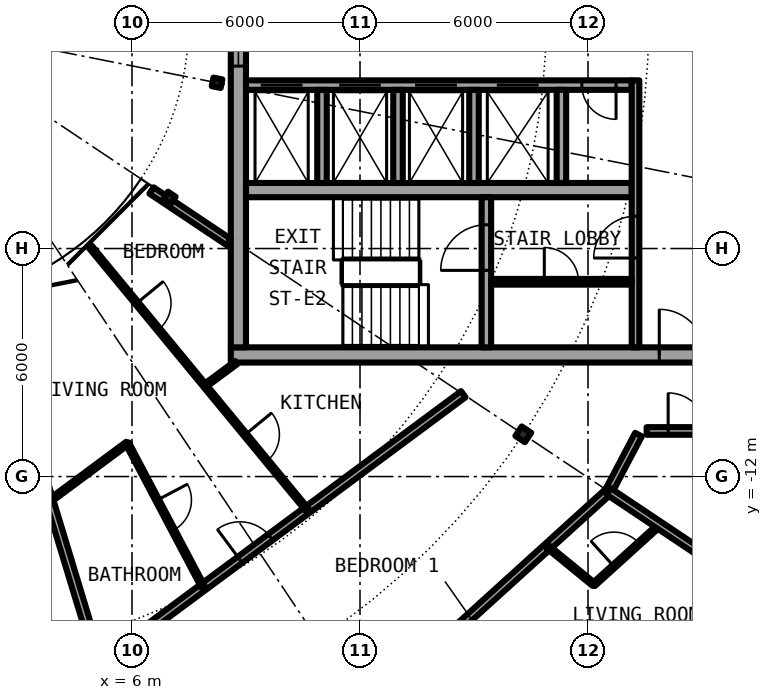
"""IFC4 building model, lengths in metres.
Left out: names, types, materials, properties, quantities, classifications, styles, units other than length and angle.
Written with IfcOpenShell. Run it as: python <this file> out.ifc"""

import sys

from ifc_helpers import new_model, si_unit, direction, frame, frame_2d, origin, origin_2d, place, context, subcontext, project, spatial, rectangle, i_section, extrude, element, fill, save


model = new_model("IFC4")
c1 = context("Model", 3, precision=1e-05, world=origin(), true_north=direction((0.0, 1.0)))
c2 = subcontext(c1, "Body", "Model", "MODEL_VIEW")
j1 = project(units=[si_unit("LENGTHUNIT", "METRE"), si_unit("PLANEANGLEUNIT", "RADIAN")], contexts=[c1])
p1 = place(None, origin())
s1 = spatial("IfcSite", under=j1, at=p1, CompositionType="ELEMENT")
p2 = place(p1, origin())
s2 = spatial("IfcBuilding", under=s1, at=p2, CompositionType="ELEMENT")
p3 = place(p2, frame((0.0, 0.0, 227.95)))
s3 = spatial("IfcBuildingStorey", under=s2, at=p3, CompositionType="ELEMENT", Elevation=227.95)
p4 = place(p3, frame((16.297, -10.889, 0.0), z_axis=(0.0, 0.0, 1.0), x_axis=(0.831469612303, -0.55557023302, 0.0)))
e1 = element("IfcColumn", 1, at=p4, inside=s3, PredefinedType="COLUMN", context=c2, shape_type="SweptSolid", body=[
    extrude(i_section(OverallWidth=0.3, OverallDepth=0.3, WebThickness=0.011, FlangeThickness=0.019, FilletRadius=0.027, at=origin_2d()), origin(), (0.0, 0.0, 1.0), 3.05),
])
for number, where, z_axis, x_axis in (
    (2, (6.984, -4.667, 0.0), (0.0, 0.0, 1.0), (0.831, -0.556, 0.0)),
    (3, (8.239, -1.639, 0.0), (0.0, 0.0, 1.0), (0.981, -0.195, 0.0)),
):
    element("IfcColumn", number, at=place(p3, frame(where, z_axis=z_axis, x_axis=x_axis)), inside=s3, PredefinedType="COLUMN", context=c2, shape_type="SweptSolid", body=[
        extrude(i_section(OverallWidth=0.24, OverallDepth=0.23, WebThickness=0.008, FlangeThickness=0.012, FilletRadius=0.021, at=origin_2d()), origin(), (0.0, 0.0, 1.0), 3.05),
    ])
p5 = place(p3, frame((19.304, -19.304, 0.0), z_axis=(0.0, 0.0, 1.0), x_axis=(0.634382322723, 0.773019449054, 0.0)))
e4 = element("IfcWall", 4, at=p5, inside=s3, PredefinedType="SOLIDWALL", context=c2, shape_type="SweptSolid", body=[
    extrude(rectangle(XDim=5.352, YDim=0.25, at=frame_2d((2.676, 0.0))), origin(), (0.0, 0.0, 1.0), 2.7),
])
p6 = place(p5, frame((0.841, 0.0, 0.0)))
e5 = element("IfcOpeningElement", 5, at=p6, cuts=e4, PredefinedType="OPENING", context=c2, shape_type="SweptSolid", body=[
    extrude(rectangle(XDim=1.0, YDim=2.2, at=frame_2d((0.5, 1.1))), frame((0.0, 0.135, 0.0), z_axis=(0.0, -1.0, 0.0), x_axis=(1.0, 0.0, 0.0)), (0.0, 0.0, 1.0), 0.27),
])
p7 = place(p5, frame((3.111, 0.0, 0.3)))
e6 = element("IfcOpeningElement", 6, at=p7, cuts=e4, PredefinedType="OPENING", context=c2, shape_type="SweptSolid", body=[
    extrude(rectangle(XDim=1.8, YDim=2.1, at=frame_2d((0.9, 1.05))), frame((0.0, 0.135, 0.0), z_axis=(0.0, -1.0, 0.0), x_axis=(1.0, 0.0, 0.0)), (0.0, 0.0, 1.0), 0.27),
])
p8 = place(p3, frame((8.6, -8.8, 0.0), z_axis=(0.0, 0.0, 1.0), x_axis=(1.0, 0.0, 0.0)))
e7 = element("IfcWall", 7, at=p8, inside=s3, PredefinedType="SHEAR", context=c2, shape_type="SweptSolid", body=[
    extrude(rectangle(XDim=13.4, YDim=0.4, at=frame_2d((6.7, 0.0))), origin(), (0.0, 0.0, 1.0), 3.05),
])
p9 = place(p8, frame((11.275, 0.0, 0.0)))
e8 = element("IfcOpeningElement", 8, at=p9, cuts=e7, PredefinedType="OPENING", context=c2, shape_type="SweptSolid", body=[
    extrude(rectangle(XDim=1.2, YDim=2.3, at=frame_2d((0.6, 1.15))), frame((0.0, 0.21, 0.0), z_axis=(0.0, -1.0, 0.0), x_axis=(1.0, 0.0, 0.0)), (0.0, 0.0, 1.0), 0.42),
])
p10 = place(p3, frame((8.8, -8.6, 0.0), z_axis=(0.0, 0.0, 1.0), x_axis=(0.0, 1.0, 0.0)))
e9 = element("IfcWall", 9, at=p10, inside=s3, PredefinedType="SHEAR", context=c2, shape_type="SweptSolid", body=[
    extrude(rectangle(XDim=17.2, YDim=0.4, at=frame_2d((8.6, 0.0))), origin(), (0.0, 0.0, 1.0), 3.05),
])
p11 = place(p10, frame((7.4, 0.0, 0.1)))
e10 = element("IfcOpeningElement", 10, at=p11, cuts=e9, PredefinedType="OPENING", context=c2, shape_type="SweptSolid", body=[
    extrude(rectangle(XDim=2.4, YDim=2.2, at=frame_2d((1.2, 1.1))), frame((0.0, 0.21, 0.0), z_axis=(0.0, -1.0, 0.0), x_axis=(1.0, 0.0, 0.0)), (0.0, 0.0, 1.0), 0.42),
])
p12 = place(p3, frame((19.15, -1.7, 0.0), z_axis=(0.0, 0.0, 1.0), x_axis=(-1.0, 0.0, 0.0)))
e11 = element("IfcWall", 11, at=p12, inside=s3, PredefinedType="SHEAR", context=c2, shape_type="SweptSolid", body=[
    extrude(rectangle(XDim=10.15, YDim=0.25, at=frame_2d((5.075, 0.0))), origin(), (0.0, 0.0, 1.0), 3.05),
])
p13 = place(p12, frame((8.663, 0.0, 0.0)))
e12 = element("IfcOpeningElement", 12, at=p13, cuts=e11, PredefinedType="OPENING", context=c2, shape_type="SweptSolid", body=[
    extrude(rectangle(XDim=1.1, YDim=2.3, at=frame_2d((0.55, 1.15))), frame((0.0, 0.135, 0.0), z_axis=(0.0, -1.0, 0.0), x_axis=(1.0, 0.0, 0.0)), (0.0, 0.0, 1.0), 0.27),
])
p14 = place(p12, frame((6.6, 0.0, 0.0)))
e13 = element("IfcOpeningElement", 13, at=p14, cuts=e11, PredefinedType="OPENING", context=c2, shape_type="SweptSolid", body=[
    extrude(rectangle(XDim=1.1, YDim=2.3, at=frame_2d((0.55, 1.15))), frame((0.0, 0.135, 0.0), z_axis=(0.0, -1.0, 0.0), x_axis=(1.0, 0.0, 0.0)), (0.0, 0.0, 1.0), 0.27),
])
p15 = place(p12, frame((4.6, 0.0, 0.0)))
e14 = element("IfcOpeningElement", 14, at=p15, cuts=e11, PredefinedType="OPENING", context=c2, shape_type="SweptSolid", body=[
    extrude(rectangle(XDim=1.1, YDim=2.3, at=frame_2d((0.55, 1.15))), frame((0.0, 0.135, 0.0), z_axis=(0.0, -1.0, 0.0), x_axis=(1.0, 0.0, 0.0)), (0.0, 0.0, 1.0), 0.27),
])
p16 = place(p12, frame((2.45, 0.0, 0.0)))
e15 = element("IfcOpeningElement", 15, at=p16, cuts=e11, PredefinedType="OPENING", context=c2, shape_type="SweptSolid", body=[
    extrude(rectangle(XDim=1.1, YDim=2.3, at=frame_2d((0.55, 1.15))), frame((0.0, 0.135, 0.0), z_axis=(0.0, -1.0, 0.0), x_axis=(1.0, 0.0, 0.0)), (0.0, 0.0, 1.0), 0.27),
])
p17 = place(p12, frame((0.413, 0.0, 0.0)))
e16 = element("IfcOpeningElement", 16, at=p17, cuts=e11, PredefinedType="OPENING", context=c2, shape_type="SweptSolid", body=[
    extrude(rectangle(XDim=0.9, YDim=2.3, at=frame_2d((0.45, 1.15))), frame((0.0, 0.135, 0.0), z_axis=(0.0, -1.0, 0.0), x_axis=(1.0, 0.0, 0.0)), (0.0, 0.0, 1.0), 0.27),
])
p18 = place(p3, frame((9.0, -4.462, 0.0), z_axis=(0.0, 0.0, 1.0), x_axis=(1.0, 0.0, 0.0)))
e17 = element("IfcWall", 17, at=p18, inside=s3, PredefinedType="SHEAR", context=c2, shape_type="SweptSolid", body=[
    extrude(rectangle(XDim=10.15, YDim=0.375, at=frame_2d((5.075, 0.0))), origin(), (0.0, 0.0, 1.0), 3.05),
])
p19 = place(p3, frame((15.325, -8.6, 0.0), z_axis=(0.0, 0.0, 1.0), x_axis=(0.0, 1.0, 0.0)))
e18 = element("IfcWall", 18, at=p19, inside=s3, PredefinedType="SHEAR", context=c2, shape_type="SweptSolid", body=[
    extrude(rectangle(XDim=3.95, YDim=0.25, at=frame_2d((1.975, 0.0))), origin(), (0.0, 0.0, 1.0), 3.05),
])
p20 = place(p19, frame((2.025, 0.0, 0.0)))
e19 = element("IfcOpeningElement", 19, at=p20, cuts=e18, PredefinedType="OPENING", context=c2, shape_type="SweptSolid", body=[
    extrude(rectangle(XDim=1.2, YDim=2.3, at=frame_2d((0.6, 1.15))), frame((0.0, 0.135, 0.0), z_axis=(0.0, -1.0, 0.0), x_axis=(1.0, 0.0, 0.0)), (0.0, 0.0, 1.0), 0.27),
])
for number, where, z_axis, x_axis in (
    (20, (15.0, -1.825, 0.0), (0.0, 0.0, 1.0), (0.0, -1.0, 0.0)),
    (21, (17.3, -1.825, 0.0), (0.0, 0.0, 1.0), (0.0, -1.0, 0.0)),
):
    element("IfcWall", number, at=place(p3, frame(where, z_axis=z_axis, x_axis=x_axis)), inside=s3, PredefinedType="SOLIDWALL", context=c2, shape_type="SweptSolid", body=[
        extrude(rectangle(XDim=2.45, YDim=0.25, at=frame_2d((1.225, 0.0))), origin(), (0.0, 0.0, 1.0), 2.7),
    ])
p21 = place(p3, frame((19.25, -8.6, 0.0), z_axis=(0.0, 0.0, 1.0), x_axis=(0.0, 1.0, 0.0)))
e22 = element("IfcWall", 22, at=p21, inside=s3, PredefinedType="SOLIDWALL", context=c2, shape_type="SweptSolid", body=[
    extrude(rectangle(XDim=7.025, YDim=0.2, at=frame_2d((3.513, 0.0))), origin(), (0.0, 0.0, 1.0), 2.7),
])
p22 = place(p21, frame((2.35, 0.0, 0.0)))
e23 = element("IfcOpeningElement", 23, at=p22, cuts=e22, PredefinedType="OPENING", context=c2, shape_type="SweptSolid", body=[
    extrude(rectangle(XDim=1.1, YDim=2.3, at=frame_2d((0.55, 1.15))), frame((0.0, 0.11, 0.0), z_axis=(0.0, -1.0, 0.0), x_axis=(1.0, 0.0, 0.0)), (0.0, 0.0, 1.0), 0.22),
])
for number, where, z_axis, x_axis in (
    (24, (11.0, -1.825, 0.0), (0.0, 0.0, 1.0), (0.0, -1.0, 0.0)),
    (25, (13.0, -1.825, 0.0), (0.0, 0.0, 1.0), (0.0, -1.0, 0.0)),
):
    element("IfcWall", number, at=place(p3, frame(where, z_axis=z_axis, x_axis=x_axis)), inside=s3, PredefinedType="SOLIDWALL", context=c2, shape_type="SweptSolid", body=[
        extrude(rectangle(XDim=2.45, YDim=0.25, at=frame_2d((1.225, 0.0))), origin(), (0.0, 0.0, 1.0), 2.7),
    ])
p23 = place(p3, frame((15.45, -6.875, 0.0), z_axis=(0.0, 0.0, 1.0), x_axis=(1.0, 0.0, 0.0)))
e26 = element("IfcWall", 26, at=p23, inside=s3, PredefinedType="PARTITIONING", context=c2, shape_type="SweptSolid", body=[
    extrude(rectangle(XDim=3.7, YDim=0.15, at=frame_2d((1.85, 0.0))), origin(), (0.0, 0.0, 1.0), 2.7),
])
p24 = place(p23, frame((1.4, 0.0, 0.0)))
e27 = element("IfcOpeningElement", 27, at=p24, cuts=e26, PredefinedType="OPENING", context=c2, shape_type="SweptSolid", body=[
    extrude(rectangle(XDim=0.9, YDim=2.3, at=frame_2d((0.45, 1.15))), frame((0.0, 0.085, 0.0), z_axis=(0.0, -1.0, 0.0), x_axis=(1.0, 0.0, 0.0)), (0.0, 0.0, 1.0), 0.17),
])
p25 = place(p3, frame((18.147, -14.844, 0.0), z_axis=(0.0, 0.0, 1.0), x_axis=(0.741080073381, 0.671416655169, 0.0)))
e28 = element("IfcWall", 28, at=p25, inside=s3, PredefinedType="PARTITIONING", context=c2, shape_type="SweptSolid", body=[
    extrude(rectangle(XDim=2.323, YDim=0.1, at=frame_2d((1.162, 0.0))), origin(), (0.0, 0.0, 1.0), 2.7),
])
p26 = place(p25, frame((0.718, 0.0, 0.0)))
e29 = element("IfcOpeningElement", 29, at=p26, cuts=e28, PredefinedType="OPENING", context=c2, shape_type="SweptSolid", body=[
    extrude(rectangle(XDim=0.9, YDim=2.3, at=frame_2d((0.45, 1.15))), frame((0.0, 0.06, 0.0), z_axis=(0.0, -1.0, 0.0), x_axis=(1.0, 0.0, 0.0)), (0.0, 0.0, 1.0), 0.12),
])
p27 = place(p3, frame((18.542, -12.389, 0.0), z_axis=(0.0, 0.0, 1.0), x_axis=(0.465812036273, 0.88488369115, 0.0)))
e30 = element("IfcWall", 30, at=p27, inside=s3, PredefinedType="PARTITIONING", context=c2, shape_type="SweptSolid", body=[
    extrude(rectangle(XDim=1.687, YDim=0.2, at=frame_2d((0.844, 0.0))), origin(), (0.0, 0.0, 1.0), 2.7),
])
p28 = place(p3, frame((10.512, -19.667, 0.0), z_axis=(0.0, 0.0, 1.0), x_axis=(0.740947367223, 0.671563101283, 0.0)))
e31 = element("IfcWall", 31, at=p28, inside=s3, PredefinedType="PARTITIONING", context=c2, shape_type="SweptSolid", body=[
    extrude(rectangle(XDim=10.837, YDim=0.2, at=frame_2d((5.419, 0.0))), origin(), (0.0, 0.0, 1.0), 2.7),
])
p29 = place(p28, frame((3.835, 0.0, 0.0)))
e32 = element("IfcOpeningElement", 32, at=p29, cuts=e31, PredefinedType="OPENING", context=c2, shape_type="SweptSolid", body=[
    extrude(rectangle(XDim=1.0, YDim=2.3, at=frame_2d((0.5, 1.15))), frame((0.0, 0.11, 0.0), z_axis=(0.0, -1.0, 0.0), x_axis=(1.0, 0.0, 0.0)), (0.0, 0.0, 1.0), 0.22),
])
p30 = place(p3, frame((5.137, -16.938, 0.0), z_axis=(0.0, 0.0, 1.0), x_axis=(0.803240181354, 0.595655278712, 0.0)))
e33 = element("IfcWall", 33, at=p30, inside=s3, PredefinedType="PARTITIONING", context=c2, shape_type="SweptSolid", body=[
    extrude(rectangle(XDim=11.928, YDim=0.2, at=frame_2d((5.964, 0.0))), origin(), (0.0, 0.0, 1.0), 2.7),
])
p31 = place(p30, frame((4.612, 0.0, 0.0)))
e34 = element("IfcOpeningElement", 34, at=p31, cuts=e33, PredefinedType="OPENING", context=c2, shape_type="SweptSolid", body=[
    extrude(rectangle(XDim=1.0, YDim=2.3, at=frame_2d((0.5, 1.15))), frame((0.0, 0.11, 0.0), z_axis=(0.0, -1.0, 0.0), x_axis=(1.0, 0.0, 0.0)), (0.0, 0.0, 1.0), 0.22),
])
p32 = place(p3, frame((3.834, -12.64, 0.0), z_axis=(0.0, 0.0, 1.0), x_axis=(0.803259509791, 0.595629213463, 0.0)))
e35 = element("IfcWall", 35, at=p32, inside=s3, PredefinedType="PARTITIONING", context=c2, shape_type="SweptSolid", body=[
    extrude(rectangle(XDim=2.543, YDim=0.1, at=frame_2d((1.272, 0.0))), origin(), (0.0, 0.0, 1.0), 2.7),
])
p33 = place(p3, frame((7.919, -9.611, 0.0), z_axis=(0.0, 0.0, 1.0), x_axis=(0.80321556998, 0.595688465677, 0.0)))
e36 = element("IfcWall", 36, at=p33, inside=s3, PredefinedType="PARTITIONING", context=c2, shape_type="SweptSolid", body=[
    extrude(rectangle(XDim=1.026, YDim=0.1, at=frame_2d((0.513, 0.0))), origin(), (0.0, 0.0, 1.0), 2.7),
])
p34 = place(p3, frame((19.543, -10.8, 0.0), z_axis=(0.0, 0.0, 1.0), x_axis=(1.0, 0.0, 0.0)))
e37 = element("IfcWall", 37, at=p34, inside=s3, PredefinedType="PARTITIONING", context=c2, shape_type="SweptSolid", body=[
    extrude(rectangle(XDim=2.132, YDim=0.2, at=frame_2d((1.066, 0.0))), origin(), (0.0, 0.0, 1.0), 2.7),
])
p35 = place(p34, frame((0.566, 0.0, 0.0)))
e38 = element("IfcOpeningElement", 38, at=p35, cuts=e37, PredefinedType="OPENING", context=c2, shape_type="SweptSolid", body=[
    extrude(rectangle(XDim=1.0, YDim=2.3, at=frame_2d((0.5, 1.15))), frame((0.0, 0.11, 0.0), z_axis=(0.0, -1.0, 0.0), x_axis=(1.0, 0.0, 0.0)), (0.0, 0.0, 1.0), 0.22),
])
p36 = place(p3, frame((6.513, -4.472, 0.0), z_axis=(0.0, 0.0, 1.0), x_axis=(0.831450132577, -0.555599385382, 0.0)))
e39 = element("IfcWall", 39, at=p36, inside=s3, PredefinedType="PARTITIONING", context=c2, shape_type="SweptSolid", body=[
    extrude(rectangle(XDim=2.443, YDim=0.2, at=frame_2d((1.221, 0.0))), origin(), (0.0, 0.0, 1.0), 2.7),
])
p37 = place(p3, frame((2.241, -7.388, 0.0), z_axis=(0.0, 0.0, 1.0), x_axis=(0.290284403441, -0.956940418793, 0.0)))
e40 = element("IfcWall", 40, at=p37, inside=s3, PredefinedType="PARTITIONING", context=c2, shape_type="SweptSolid", body=[
    extrude(rectangle(XDim=9.98, YDim=0.2, at=frame_2d((4.99, 0.0))), origin(), (0.0, 0.0, 1.0), 2.7),
])
p38 = place(p3, frame((4.908, -5.959, 0.0), z_axis=(0.0, 0.0, 1.0), x_axis=(0.636115614725, -0.771593756262, 0.0)))
e41 = element("IfcWall", 41, at=p38, inside=s3, PredefinedType="PARTITIONING", context=c2, shape_type="SweptSolid", body=[
    extrude(rectangle(XDim=8.967, YDim=0.1, at=frame_2d((4.483, 0.0))), origin(), (0.0, 0.0, 1.0), 2.7),
])
p39 = place(p38, frame((6.4, 0.0, 0.0)))
e42 = element("IfcOpeningElement", 42, at=p39, cuts=e41, PredefinedType="OPENING", context=c2, shape_type="SweptSolid", body=[
    extrude(rectangle(XDim=0.9, YDim=2.3, at=frame_2d((0.45, 1.15))), frame((0.0, 0.06, 0.0), z_axis=(0.0, -1.0, 0.0), x_axis=(1.0, 0.0, 0.0)), (0.0, 0.0, 1.0), 0.12),
])
p40 = place(p38, frame((1.917, 0.0, 0.0)))
e43 = element("IfcOpeningElement", 43, at=p40, cuts=e41, PredefinedType="OPENING", context=c2, shape_type="SweptSolid", body=[
    extrude(rectangle(XDim=0.9, YDim=2.3, at=frame_2d((0.45, 1.15))), frame((0.0, 0.06, 0.0), z_axis=(0.0, -1.0, 0.0), x_axis=(1.0, 0.0, 0.0)), (0.0, 0.0, 1.0), 0.12),
])
p41 = place(p3, frame((5.876, -11.126, 0.0), z_axis=(0.0, 0.0, 1.0), x_axis=(0.467030118529, -0.884241408432, 0.0)))
e44 = element("IfcWall", 44, at=p41, inside=s3, PredefinedType="PARTITIONING", context=c2, shape_type="SweptSolid", body=[
    extrude(rectangle(XDim=4.278, YDim=0.1, at=frame_2d((2.139, 0.0))), origin(), (0.0, 0.0, 1.0), 2.7),
])
p42 = place(p41, frame((1.689, 0.0, 0.0)))
e45 = element("IfcOpeningElement", 45, at=p42, cuts=e44, PredefinedType="OPENING", context=c2, shape_type="SweptSolid", body=[
    extrude(rectangle(XDim=0.9, YDim=2.3, at=frame_2d((0.45, 1.15))), frame((0.0, 0.06, 0.0), z_axis=(0.0, -1.0, 0.0), x_axis=(1.0, 0.0, 0.0)), (0.0, 0.0, 1.0), 0.12),
])
p43 = place(p3, frame((16.936, -13.845, 0.0), z_axis=(0.0, 0.0, 1.0), x_axis=(0.774283039722, -0.632839453889, 0.0)))
e46 = element("IfcWall", 46, at=p43, inside=s3, PredefinedType="PARTITIONING", context=c2, shape_type="SweptSolid", body=[
    extrude(rectangle(XDim=1.569, YDim=0.1, at=frame_2d((0.785, 0.0))), origin(), (0.0, 0.0, 1.0), 2.7),
])
p44 = place(p3, frame((18.542, -12.389, 0.0), z_axis=(0.0, 0.0, 1.0), x_axis=(0.831387096605, -0.55569370664, 0.0)))
e47 = element("IfcWall", 47, at=p44, inside=s3, PredefinedType="PARTITIONING", context=c2, shape_type="SweptSolid", body=[
    extrude(rectangle(XDim=4.875, YDim=0.2, at=frame_2d((2.438, 0.0))), origin(), (0.0, 0.0, 1.0), 2.7),
])
p45 = place(p13, origin())
e48 = element("IfcDoor", 48, at=p45, inside=s3, OperationType="DOUBLE_DOOR_SLIDING", PredefinedType="DOOR", context=c2, shape_type="SweptSolid", body=[
    extrude(rectangle(XDim=1.1, YDim=2.3, at=frame_2d((0.55, 1.15))), frame((0.0, 0.025, 0.0), z_axis=(0.0, -1.0, 0.0), x_axis=(1.0, 0.0, 0.0)), (0.0, 0.0, 1.0), 0.05),
])
fill(e12, e48)
p46 = place(p14, origin())
e49 = element("IfcDoor", 49, at=p46, inside=s3, OperationType="DOUBLE_DOOR_SLIDING", PredefinedType="DOOR", context=c2, shape_type="SweptSolid", body=[
    extrude(rectangle(XDim=1.1, YDim=2.3, at=frame_2d((0.55, 1.15))), frame((0.0, 0.025, 0.0), z_axis=(0.0, -1.0, 0.0), x_axis=(1.0, 0.0, 0.0)), (0.0, 0.0, 1.0), 0.05),
])
fill(e13, e49)
p47 = place(p15, origin())
e50 = element("IfcDoor", 50, at=p47, inside=s3, OperationType="DOUBLE_DOOR_SLIDING", PredefinedType="DOOR", context=c2, shape_type="SweptSolid", body=[
    extrude(rectangle(XDim=1.1, YDim=2.3, at=frame_2d((0.55, 1.15))), frame((0.0, 0.025, 0.0), z_axis=(0.0, -1.0, 0.0), x_axis=(1.0, 0.0, 0.0)), (0.0, 0.0, 1.0), 0.05),
])
fill(e14, e50)
p48 = place(p16, origin())
e51 = element("IfcDoor", 51, at=p48, inside=s3, OperationType="DOUBLE_DOOR_SLIDING", PredefinedType="DOOR", context=c2, shape_type="SweptSolid", body=[
    extrude(rectangle(XDim=1.1, YDim=2.3, at=frame_2d((0.55, 1.15))), frame((0.0, 0.025, 0.0), z_axis=(0.0, -1.0, 0.0), x_axis=(1.0, 0.0, 0.0)), (0.0, 0.0, 1.0), 0.05),
])
fill(e15, e51)
p49 = place(p17, origin())
e52 = element("IfcDoor", 52, at=p49, inside=s3, OperationType="SINGLE_SWING_RIGHT", PredefinedType="DOOR", context=c2, shape_type="SweptSolid", body=[
    extrude(rectangle(XDim=0.9, YDim=2.3, at=frame_2d((0.45, 1.15))), frame((0.0, 0.025, 0.0), z_axis=(0.0, -1.0, 0.0), x_axis=(1.0, 0.0, 0.0)), (0.0, 0.0, 1.0), 0.05),
])
fill(e16, e52)
p50 = place(p24, origin())
e53 = element("IfcDoor", 53, at=p50, inside=s3, OperationType="SINGLE_SWING_LEFT", PredefinedType="DOOR", context=c2, shape_type="SweptSolid", body=[
    extrude(rectangle(XDim=0.9, YDim=2.3, at=frame_2d((0.45, 1.15))), frame((0.0, 0.025, 0.0), z_axis=(0.0, -1.0, 0.0), x_axis=(1.0, 0.0, 0.0)), (0.0, 0.0, 1.0), 0.05),
])
fill(e27, e53)
p51 = place(p20, origin())
e54 = element("IfcDoor", 54, at=p51, inside=s3, OperationType="SINGLE_SWING_LEFT", PredefinedType="DOOR", context=c2, shape_type="SweptSolid", body=[
    extrude(rectangle(XDim=1.2, YDim=2.3, at=frame_2d((0.6, 1.15))), frame((0.0, 0.025, 0.0), z_axis=(0.0, -1.0, 0.0), x_axis=(1.0, 0.0, 0.0)), (0.0, 0.0, 1.0), 0.05),
])
fill(e19, e54)
p52 = place(p22, origin())
e55 = element("IfcDoor", 55, at=p52, inside=s3, OperationType="SINGLE_SWING_RIGHT", PredefinedType="DOOR", context=c2, shape_type="SweptSolid", body=[
    extrude(rectangle(XDim=1.1, YDim=2.3, at=frame_2d((0.55, 1.15))), frame((0.0, 0.025, 0.0), z_axis=(0.0, -1.0, 0.0), x_axis=(1.0, 0.0, 0.0)), (0.0, 0.0, 1.0), 0.05),
])
fill(e23, e55)
p53 = place(p9, origin())
e56 = element("IfcDoor", 56, at=p53, inside=s3, OperationType="SINGLE_SWING_LEFT", PredefinedType="DOOR", context=c2, shape_type="SweptSolid", body=[
    extrude(rectangle(XDim=1.2, YDim=2.3, at=frame_2d((0.6, 1.15))), frame((0.0, 0.025, 0.0), z_axis=(0.0, -1.0, 0.0), x_axis=(1.0, 0.0, 0.0)), (0.0, 0.0, 1.0), 0.05),
])
fill(e8, e56)
p54 = place(p11, origin())
e57 = element("IfcWindow", 57, at=p54, inside=s3, PartitioningType="SINGLE_PANEL", PredefinedType="WINDOW", context=c2, shape_type="SweptSolid", body=[
    extrude(rectangle(XDim=2.4, YDim=2.2, at=frame_2d((1.2, 1.1))), frame((0.0, 0.03, 0.0), z_axis=(0.0, -1.0, 0.0), x_axis=(1.0, 0.0, 0.0)), (0.0, 0.0, 1.0), 0.06),
])
fill(e10, e57)
p55 = place(p26, origin())
e58 = element("IfcDoor", 58, at=p55, inside=s3, OperationType="SINGLE_SWING_RIGHT", PredefinedType="DOOR", context=c2, shape_type="SweptSolid", body=[
    extrude(rectangle(XDim=0.9, YDim=2.3, at=frame_2d((0.45, 1.15))), frame((0.0, 0.025, 0.0), z_axis=(0.0, -1.0, 0.0), x_axis=(1.0, 0.0, 0.0)), (0.0, 0.0, 1.0), 0.05),
])
fill(e29, e58)
p56 = place(p31, origin())
e59 = element("IfcDoor", 59, at=p56, inside=s3, OperationType="SINGLE_SWING_LEFT", PredefinedType="DOOR", context=c2, shape_type="SweptSolid", body=[
    extrude(rectangle(XDim=1.0, YDim=2.3, at=frame_2d((0.5, 1.15))), frame((0.0, 0.025, 0.0), z_axis=(0.0, -1.0, 0.0), x_axis=(1.0, 0.0, 0.0)), (0.0, 0.0, 1.0), 0.05),
])
fill(e34, e59)
p57 = place(p42, origin())
e60 = element("IfcDoor", 60, at=p57, inside=s3, OperationType="SINGLE_SWING_LEFT", PredefinedType="DOOR", context=c2, shape_type="SweptSolid", body=[
    extrude(rectangle(XDim=0.9, YDim=2.3, at=frame_2d((0.45, 1.15))), frame((0.0, 0.025, 0.0), z_axis=(0.0, -1.0, 0.0), x_axis=(1.0, 0.0, 0.0)), (0.0, 0.0, 1.0), 0.05),
])
fill(e45, e60)
p58 = place(p39, origin())
e61 = element("IfcDoor", 61, at=p58, inside=s3, OperationType="SINGLE_SWING_RIGHT", PredefinedType="DOOR", context=c2, shape_type="SweptSolid", body=[
    extrude(rectangle(XDim=0.9, YDim=2.3, at=frame_2d((0.45, 1.15))), frame((0.0, 0.025, 0.0), z_axis=(0.0, -1.0, 0.0), x_axis=(1.0, 0.0, 0.0)), (0.0, 0.0, 1.0), 0.05),
])
fill(e42, e61)
p59 = place(p40, origin())
e62 = element("IfcDoor", 62, at=p59, inside=s3, OperationType="SINGLE_SWING_LEFT", PredefinedType="DOOR", context=c2, shape_type="SweptSolid", body=[
    extrude(rectangle(XDim=0.9, YDim=2.3, at=frame_2d((0.45, 1.15))), frame((0.0, 0.025, 0.0), z_axis=(0.0, -1.0, 0.0), x_axis=(1.0, 0.0, 0.0)), (0.0, 0.0, 1.0), 0.05),
])
fill(e43, e62)
p60 = place(p35, origin())
e63 = element("IfcDoor", 63, at=p60, inside=s3, OperationType="SINGLE_SWING_RIGHT", PredefinedType="DOOR", context=c2, shape_type="SweptSolid", body=[
    extrude(rectangle(XDim=1.0, YDim=2.3, at=frame_2d((0.5, 1.15))), frame((0.0, 0.025, 0.0), z_axis=(0.0, -1.0, 0.0), x_axis=(1.0, 0.0, 0.0)), (0.0, 0.0, 1.0), 0.05),
])
fill(e38, e63)
save(model, sys.argv[1])
